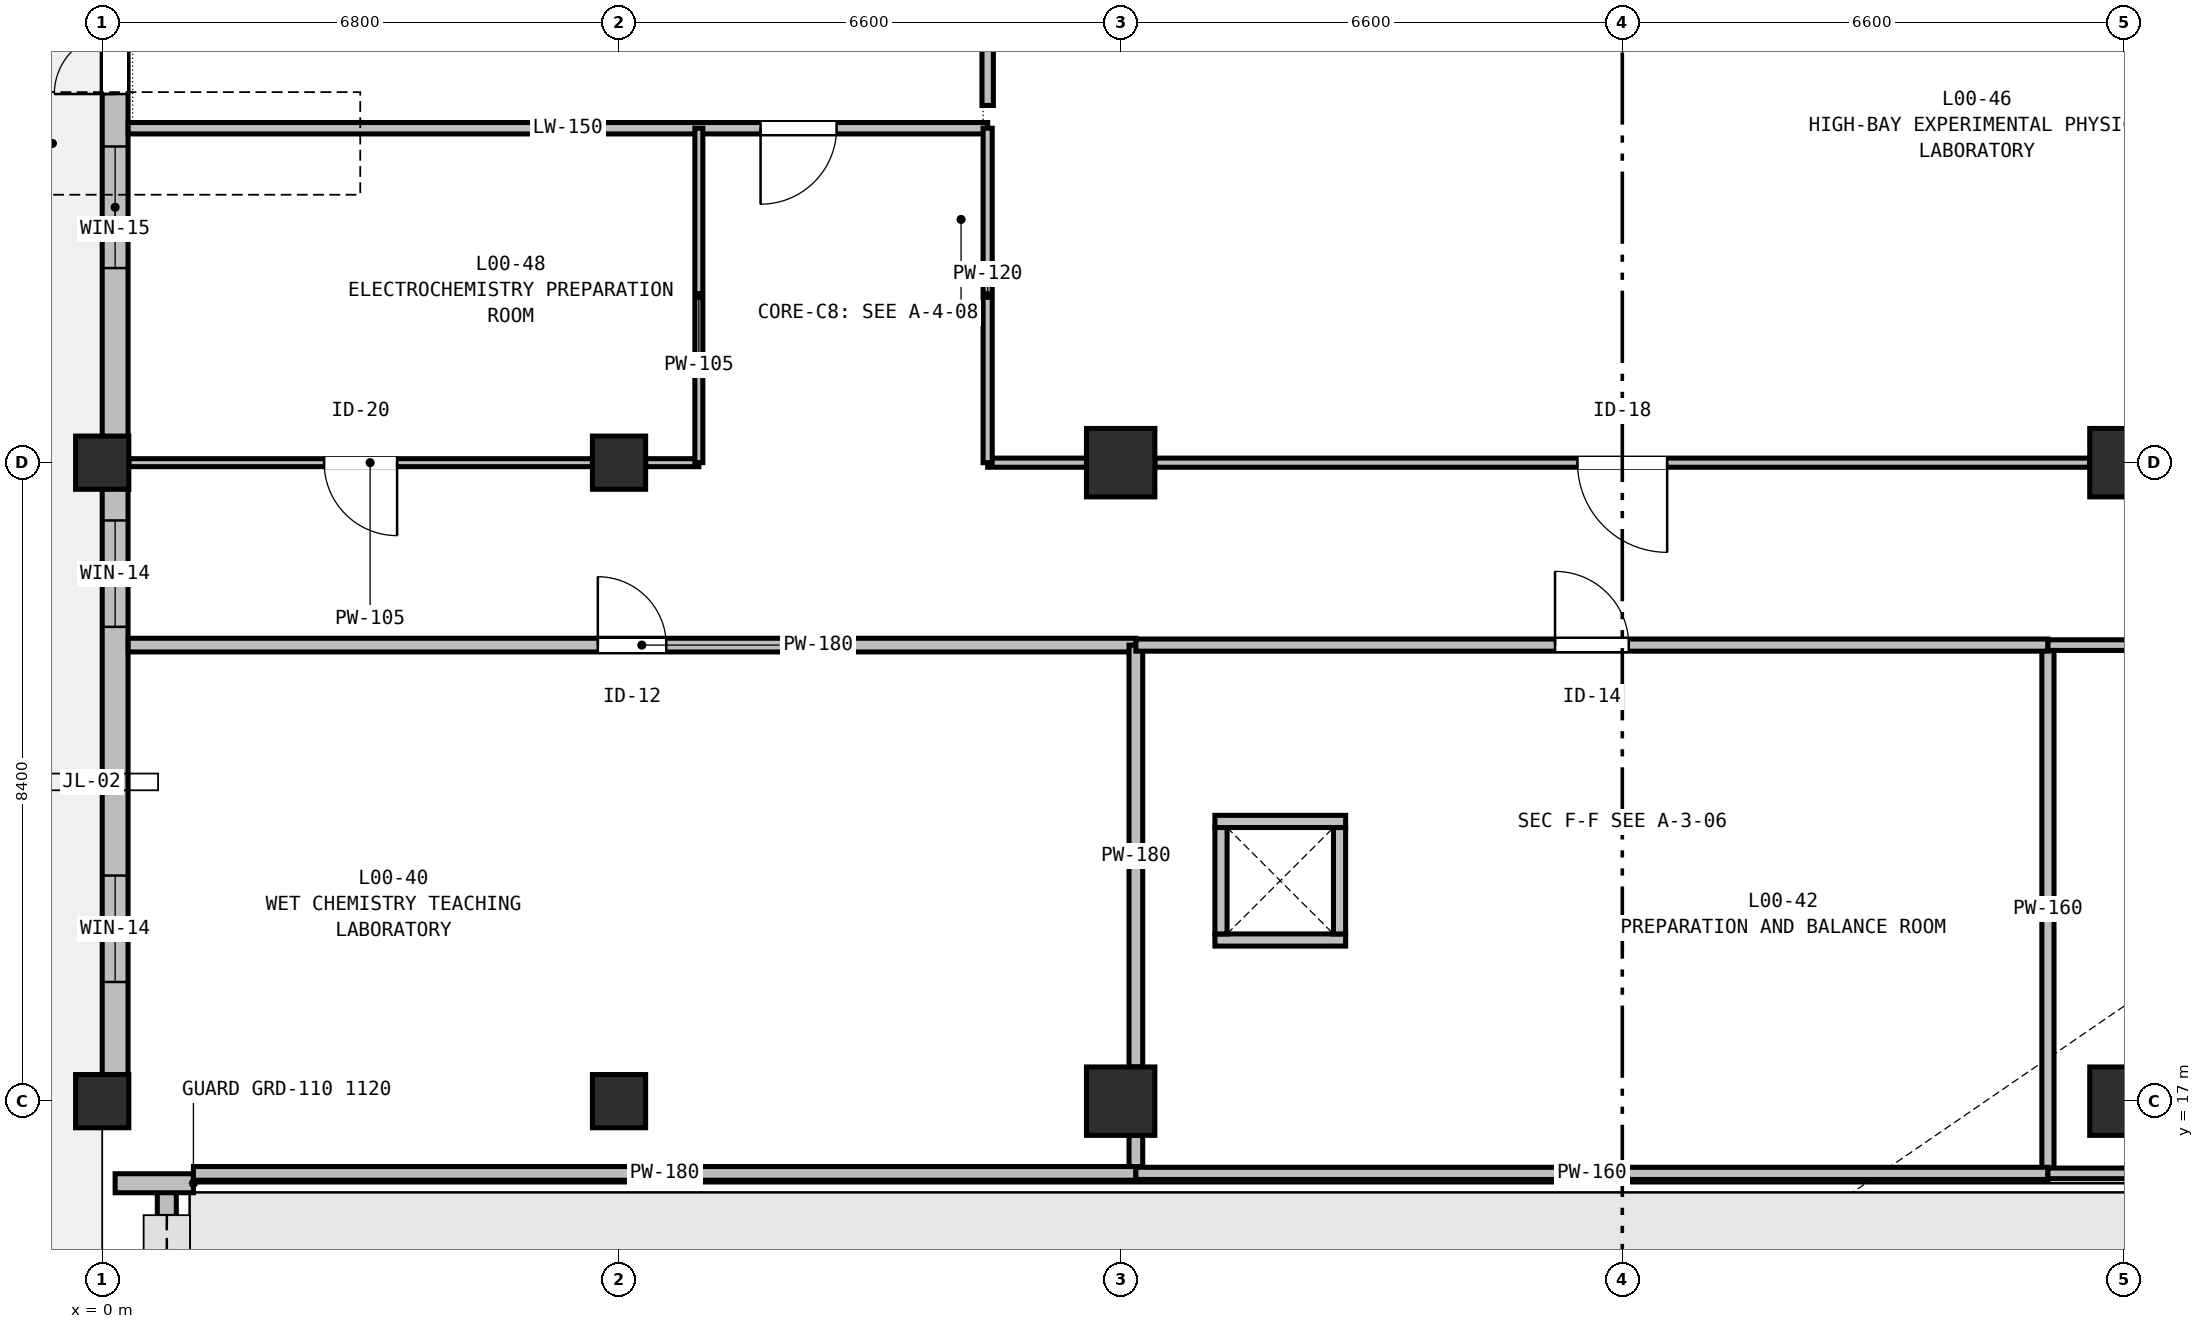
"""IFC4 building model, lengths in metres.
Left out: names, types, materials, properties, quantities, classifications, styles, units other than length and angle.
Written with IfcOpenShell. Run it as: python <this file> out.ifc"""

import sys

from ifc_helpers import new_model, si_unit, direction, frame, frame_2d, origin, origin_2d, place, context, subcontext, project, spatial, rectangle, extrude, element, fill, save


model = new_model("IFC4")
c1 = context("Model", 3, precision=1e-05, world=origin(), true_north=direction((0.0, 1.0)))
c2 = subcontext(c1, "Body", "Model", "MODEL_VIEW")
j1 = project(units=[si_unit("LENGTHUNIT", "METRE"), si_unit("PLANEANGLEUNIT", "RADIAN")], contexts=[c1])
p1 = place(None, origin())
s1 = spatial("IfcSite", under=j1, at=p1, CompositionType="ELEMENT")
p2 = place(p1, origin())
s2 = spatial("IfcBuilding", under=s1, at=p2, CompositionType="ELEMENT")
p3 = place(p2, origin())
s3 = spatial("IfcBuildingStorey", under=s2, at=p3, CompositionType="ELEMENT", Elevation=0.0)
for number, where, z_axis, x_axis in (
    (1, (0.0, 17.0, -0.32), (0.0, 0.0, 1.0), (1.0, 0.0, 0.0)),
    (2, (0.0, 25.4, -0.32), (0.0, 0.0, 1.0), (1.0, 0.0, 0.0)),
    (3, (6.8, 17.0, -0.32), (0.0, 0.0, 1.0), (1.0, 0.0, 0.0)),
    (4, (6.8, 25.4, -0.32), (0.0, 0.0, 1.0), (1.0, 0.0, 0.0)),
):
    element("IfcColumn", number, at=place(p3, frame(where, z_axis=z_axis, x_axis=x_axis)), inside=s3, PredefinedType="COLUMN", context=c2, shape_type="SweptSolid", body=[
        extrude(rectangle(XDim=0.7, YDim=0.7, at=origin_2d()), origin(), (0.0, 0.0, 1.0), 5.72),
    ])
for number, where, z_axis, x_axis in (
    (5, (13.4, 17.0, -0.32), (0.0, 0.0, 1.0), (1.0, 0.0, 0.0)),
    (6, (13.4, 25.4, -0.32), (0.0, 0.0, 1.0), (1.0, 0.0, 0.0)),
    (7, (26.6, 17.0, -0.32), (0.0, 0.0, 1.0), (1.0, 0.0, 0.0)),
    (8, (26.6, 25.4, -0.32), (0.0, 0.0, 1.0), (1.0, 0.0, 0.0)),
):
    element("IfcColumn", number, at=place(p3, frame(where, z_axis=z_axis, x_axis=x_axis)), inside=s3, PredefinedType="COLUMN", context=c2, shape_type="SweptSolid", body=[
        extrude(rectangle(XDim=0.9, YDim=0.9, at=origin_2d()), origin(), (0.0, 0.0, 1.0), 5.72),
    ])
p4 = place(p3, frame((0.17, 17.0, 0.0), z_axis=(0.0, 0.0, 1.0), x_axis=(0.0, 1.0, 0.0)))
e9 = element("IfcWall", 9, at=p4, inside=s3, PredefinedType="STANDARD", context=c2, shape_type="SweptSolid", body=[
    extrude(rectangle(XDim=8.4, YDim=0.34, at=frame_2d((4.2, 0.0))), origin(), (0.0, 0.0, 1.0), 4.685),
])
p5 = place(p4, frame((1.568, 0.0, 0.9)))
e10 = element("IfcOpeningElement", 10, at=p5, cuts=e9, PredefinedType="OPENING", context=c2, shape_type="SweptSolid", body=[
    extrude(rectangle(XDim=1.4, YDim=1.55, at=frame_2d((0.7, 0.775))), frame((0.0, 0.18, 0.0), z_axis=(0.0, -1.0, 0.0), x_axis=(1.0, 0.0, 0.0)), (0.0, 0.0, 1.0), 0.36),
])
p6 = place(p4, frame((6.24, 0.0, 0.9)))
e11 = element("IfcOpeningElement", 11, at=p6, cuts=e9, PredefinedType="OPENING", context=c2, shape_type="SweptSolid", body=[
    extrude(rectangle(XDim=1.4, YDim=1.55, at=frame_2d((0.7, 0.775))), frame((0.0, 0.18, 0.0), z_axis=(0.0, -1.0, 0.0), x_axis=(1.0, 0.0, 0.0)), (0.0, 0.0, 1.0), 0.36),
])
p7 = place(p3, frame((0.17, 25.4, 0.0), z_axis=(0.0, 0.0, 1.0), x_axis=(0.0, 1.0, 0.0)))
e12 = element("IfcWall", 12, at=p7, inside=s3, PredefinedType="STANDARD", context=c2, shape_type="SweptSolid", body=[
    extrude(rectangle(XDim=8.4, YDim=0.34, at=frame_2d((4.2, 0.0))), origin(), (0.0, 0.0, 1.0), 4.685),
])
p8 = place(p7, frame((4.85, 0.0, 0.0)))
e13 = element("IfcOpeningElement", 13, at=p8, cuts=e12, PredefinedType="OPENING", context=c2, shape_type="SweptSolid", body=[
    extrude(rectangle(XDim=1.6, YDim=2.2, at=frame_2d((0.8, 1.1))), frame((0.0, 0.18, 0.0), z_axis=(0.0, -1.0, 0.0), x_axis=(1.0, 0.0, 0.0)), (0.0, 0.0, 1.0), 0.36),
])
p9 = place(p7, frame((2.56, 0.0, 0.9)))
e14 = element("IfcOpeningElement", 14, at=p9, cuts=e12, PredefinedType="OPENING", context=c2, shape_type="SweptSolid", body=[
    extrude(rectangle(XDim=1.6, YDim=1.6, at=frame_2d((0.8, 0.8))), frame((0.0, 0.18, 0.0), z_axis=(0.0, -1.0, 0.0), x_axis=(1.0, 0.0, 0.0)), (0.0, 0.0, 1.0), 0.36),
])
p10 = place(p3, frame((0.85, 15.92, 0.0), z_axis=(0.0, 0.0, 1.0), x_axis=(0.0, -1.0, 0.0)))
e15 = element("IfcWall", 15, at=p10, inside=s3, PredefinedType="STANDARD", context=c2, shape_type="SweptSolid", body=[
    extrude(rectangle(XDim=6.24, YDim=0.25, at=frame_2d((3.12, 0.0))), origin(), (0.0, 0.0, 1.0), 4.45),
])
p11 = place(p10, frame((0.42, 0.0, 0.0)))
e16 = element("IfcOpeningElement", 16, at=p11, cuts=e15, PredefinedType="OPENING", context=c2, shape_type="SweptSolid", body=[
    extrude(rectangle(XDim=5.4, YDim=3.8, at=frame_2d((2.7, 1.9))), frame((0.0, 0.135, 0.0), z_axis=(0.0, -1.0, 0.0), x_axis=(1.0, 0.0, 0.0)), (0.0, 0.0, 1.0), 0.27),
])
p12 = place(p3, frame((0.17, 15.92, 0.0), z_axis=(0.0, 0.0, 1.0), x_axis=(1.0, 0.0, 0.0)))
e17 = element("IfcWall", 17, at=p12, inside=s3, PredefinedType="STANDARD", context=c2, shape_type="SweptSolid", body=[
    extrude(rectangle(XDim=1.03, YDim=0.25, at=frame_2d((0.515, 0.0))), origin(), (0.0, 0.0, 1.0), 4.45),
])
for number, where, z_axis, x_axis in (
    (18, (14.64, 19.12, 0.0), (0.0, 0.0, 1.0), (1.0, 0.0, 0.0)),
    (19, (14.64, 20.68, 0.0), (0.0, 0.0, 1.0), (1.0, 0.0, 0.0)),
):
    element("IfcWall", number, at=place(p3, frame(where, z_axis=z_axis, x_axis=x_axis)), inside=s3, PredefinedType="PARTITIONING", context=c2, shape_type="SweptSolid", body=[
        extrude(rectangle(XDim=1.72, YDim=0.16, at=frame_2d((0.86, 0.0))), origin(), (0.0, 0.0, 1.0), 5.095),
    ])
for number, where, z_axis, x_axis in (
    (20, (14.72, 19.2, 0.0), (0.0, 0.0, 1.0), (0.0, 1.0, 0.0)),
    (21, (16.28, 19.2, 0.0), (0.0, 0.0, 1.0), (0.0, 1.0, 0.0)),
):
    element("IfcWall", number, at=place(p3, frame(where, z_axis=z_axis, x_axis=x_axis)), inside=s3, PredefinedType="PARTITIONING", context=c2, shape_type="SweptSolid", body=[
        extrude(rectangle(XDim=1.4, YDim=0.16, at=frame_2d((0.7, 0.0))), origin(), (0.0, 0.0, 1.0), 5.095),
    ])
p13 = place(p3, frame((11.65, 33.7, 0.0), z_axis=(0.0, 0.0, 1.0), x_axis=(0.0, -1.0, 0.0)))
e22 = element("IfcWall", 22, at=p13, inside=s3, PredefinedType="PARTITIONING", context=c2, shape_type="SweptSolid", body=[
    extrude(rectangle(XDim=3.6, YDim=0.15, at=frame_2d((1.8, 0.0))), origin(), (0.0, 0.0, 1.0), 4.735),
])
p14 = place(p3, frame((11.65, 29.8, 0.0), z_axis=(0.0, 0.0, 1.0), x_axis=(-1.0, 0.0, 0.0)))
e23 = element("IfcWall", 23, at=p14, inside=s3, PredefinedType="PARTITIONING", context=c2, shape_type="SweptSolid", body=[
    extrude(rectangle(XDim=11.308, YDim=0.15, at=frame_2d((5.654, 0.0))), origin(), (0.0, 0.0, 1.0), 4.535),
])
p15 = place(p14, frame((1.988, 0.0, 0.0)))
e24 = element("IfcOpeningElement", 24, at=p15, cuts=e23, PredefinedType="OPENING", context=c2, shape_type="SweptSolid", body=[
    extrude(rectangle(XDim=1.0, YDim=2.1, at=frame_2d((0.5, 1.05))), frame((0.0, 0.085, 0.0), z_axis=(0.0, -1.0, 0.0), x_axis=(1.0, 0.0, 0.0)), (0.0, 0.0, 1.0), 0.17),
])
p16 = place(p3, frame((13.6, 16.05, 0.0), z_axis=(0.0, 0.0, 1.0), x_axis=(-1.0, 0.0, 0.0)))
e25 = element("IfcWall", 25, at=p16, inside=s3, PredefinedType="PARTITIONING", context=c2, shape_type="SweptSolid", body=[
    extrude(rectangle(XDim=12.4, YDim=0.18, at=frame_2d((6.2, 0.0))), origin(), (0.0, 0.0, 1.0), 4.535),
])
p17 = place(p3, frame((0.342, 23.0, 0.0), z_axis=(0.0, 0.0, 1.0), x_axis=(1.0, 0.0, 0.0)))
e26 = element("IfcWall", 26, at=p17, inside=s3, PredefinedType="PARTITIONING", context=c2, shape_type="SweptSolid", body=[
    extrude(rectangle(XDim=13.258, YDim=0.18, at=frame_2d((6.629, 0.0))), origin(), (0.0, 0.0, 1.0), 4.535),
])
p18 = place(p17, frame((6.179, 0.0, 0.0)))
e27 = element("IfcOpeningElement", 27, at=p18, cuts=e26, PredefinedType="OPENING", context=c2, shape_type="SweptSolid", body=[
    extrude(rectangle(XDim=0.9, YDim=2.1, at=frame_2d((0.45, 1.05))), frame((0.0, 0.1, 0.0), z_axis=(0.0, -1.0, 0.0), x_axis=(1.0, 0.0, 0.0)), (0.0, 0.0, 1.0), 0.2),
])
p19 = place(p3, frame((13.6, 23.0, 0.0), z_axis=(0.0, 0.0, 1.0), x_axis=(0.0, -1.0, 0.0)))
e28 = element("IfcWall", 28, at=p19, inside=s3, PredefinedType="PARTITIONING", context=c2, shape_type="SweptSolid", body=[
    extrude(rectangle(XDim=5.55, YDim=0.18, at=frame_2d((2.775, 0.0))), origin(), (0.0, 0.0, 1.0), 4.535),
])
p20 = place(p3, frame((13.6, 16.55, 0.0), z_axis=(0.0, 0.0, 1.0), x_axis=(0.0, -1.0, 0.0)))
e29 = element("IfcWall", 29, at=p20, inside=s3, PredefinedType="PARTITIONING", context=c2, shape_type="SweptSolid", body=[
    extrude(rectangle(XDim=0.41, YDim=0.18, at=frame_2d((0.205, 0.0))), origin(), (0.0, 0.0, 1.0), 4.535),
])
p21 = place(p3, frame((25.6, 23.0, 0.0), z_axis=(0.0, 0.0, 1.0), x_axis=(0.0, -1.0, 0.0)))
e30 = element("IfcWall", 30, at=p21, inside=s3, PredefinedType="PARTITIONING", context=c2, shape_type="SweptSolid", body=[
    extrude(rectangle(XDim=6.95, YDim=0.16, at=frame_2d((3.475, 0.0))), origin(), (0.0, 0.0, 1.0), 4.435),
])
p22 = place(p3, frame((25.6, 16.05, 0.0), z_axis=(0.0, 0.0, 1.0), x_axis=(-1.0, 0.0, 0.0)))
e31 = element("IfcWall", 31, at=p22, inside=s3, PredefinedType="PARTITIONING", context=c2, shape_type="SweptSolid", body=[
    extrude(rectangle(XDim=12.0, YDim=0.16, at=frame_2d((6.0, 0.0))), origin(), (0.0, 0.0, 1.0), 4.535),
])
p23 = place(p3, frame((13.6, 23.0, 0.0), z_axis=(0.0, 0.0, 1.0), x_axis=(1.0, 0.0, 0.0)))
e32 = element("IfcWall", 32, at=p23, inside=s3, PredefinedType="PARTITIONING", context=c2, shape_type="SweptSolid", body=[
    extrude(rectangle(XDim=12.0, YDim=0.16, at=frame_2d((6.0, 0.0))), origin(), (0.0, 0.0, 1.0), 4.535),
])
p24 = place(p23, frame((5.515, 0.0, 0.0)))
e33 = element("IfcOpeningElement", 33, at=p24, cuts=e32, PredefinedType="OPENING", context=c2, shape_type="SweptSolid", body=[
    extrude(rectangle(XDim=0.97, YDim=2.1, at=frame_2d((0.485, 1.05))), frame((0.0, 0.09, 0.0), z_axis=(0.0, -1.0, 0.0), x_axis=(1.0, 0.0, 0.0)), (0.0, 0.0, 1.0), 0.18),
])
p25 = place(p3, frame((33.2, 16.05, 0.0), z_axis=(0.0, 0.0, 1.0), x_axis=(-1.0, 0.0, 0.0)))
e34 = element("IfcWall", 34, at=p25, inside=s3, PredefinedType="PARTITIONING", context=c2, shape_type="SweptSolid", body=[
    extrude(rectangle(XDim=7.6, YDim=0.14, at=frame_2d((3.8, 0.0))), origin(), (0.0, 0.0, 1.0), 4.535),
])
p26 = place(p3, frame((25.6, 23.0, 0.0), z_axis=(0.0, 0.0, 1.0), x_axis=(1.0, 0.0, 0.0)))
e35 = element("IfcWall", 35, at=p26, inside=s3, PredefinedType="PARTITIONING", context=c2, shape_type="SweptSolid", body=[
    extrude(rectangle(XDim=15.0, YDim=0.14, at=frame_2d((7.5, 0.0))), origin(), (0.0, 0.0, 1.0), 4.535),
])
p27 = place(p26, frame((6.965, 0.0, 0.0)))
e36 = element("IfcOpeningElement", 36, at=p27, cuts=e35, PredefinedType="OPENING", context=c2, shape_type="SweptSolid", body=[
    extrude(rectangle(XDim=1.07, YDim=2.1, at=frame_2d((0.535, 1.05))), frame((0.0, 0.08, 0.0), z_axis=(0.0, -1.0, 0.0), x_axis=(1.0, 0.0, 0.0)), (0.0, 0.0, 1.0), 0.16),
])
p28 = place(p3, frame((26.15, 25.4, 0.0), z_axis=(0.0, 0.0, 1.0), x_axis=(-1.0, 0.0, 0.0)))
e37 = element("IfcWall", 37, at=p28, inside=s3, PredefinedType="PARTITIONING", context=c2, shape_type="SweptSolid", body=[
    extrude(rectangle(XDim=12.3, YDim=0.12, at=frame_2d((6.15, 0.0))), origin(), (0.0, 0.0, 1.0), 4.435),
])
p29 = place(p28, frame((5.56, 0.0, 0.0)))
e38 = element("IfcOpeningElement", 38, at=p29, cuts=e37, PredefinedType="OPENING", context=c2, shape_type="SweptSolid", body=[
    extrude(rectangle(XDim=1.18, YDim=2.1, at=frame_2d((0.59, 1.05))), frame((0.0, 0.07, 0.0), z_axis=(0.0, -1.0, 0.0), x_axis=(1.0, 0.0, 0.0)), (0.0, 0.0, 1.0), 0.14),
])
p30 = place(p3, frame((12.95, 25.4, 0.0), z_axis=(0.0, 0.0, 1.0), x_axis=(-1.0, 0.0, 0.0)))
e39 = element("IfcWall", 39, at=p30, inside=s3, PredefinedType="PARTITIONING", context=c2, shape_type="SweptSolid", body=[
    extrude(rectangle(XDim=1.3, YDim=0.12, at=frame_2d((0.65, 0.0))), origin(), (0.0, 0.0, 1.0), 4.735),
])
p31 = place(p3, frame((11.65, 25.4, 0.0), z_axis=(0.0, 0.0, 1.0), x_axis=(0.0, 1.0, 0.0)))
e40 = element("IfcWall", 40, at=p31, inside=s3, PredefinedType="PARTITIONING", context=c2, shape_type="SweptSolid", body=[
    extrude(rectangle(XDim=4.4, YDim=0.12, at=frame_2d((2.2, 0.0))), origin(), (0.0, 0.0, 1.0), 4.735),
])
p32 = place(p3, frame((7.85, 25.4, 0.0), z_axis=(0.0, 0.0, 1.0), x_axis=(-1.0, 0.0, 0.0)))
e41 = element("IfcWall", 41, at=p32, inside=s3, PredefinedType="PARTITIONING", context=c2, shape_type="SweptSolid", body=[
    extrude(rectangle(XDim=0.7, YDim=0.105, at=frame_2d((0.35, 0.0))), origin(), (0.0, 0.0, 1.0), 4.735),
])
p33 = place(p3, frame((6.45, 25.4, 0.0), z_axis=(0.0, 0.0, 1.0), x_axis=(-1.0, 0.0, 0.0)))
e42 = element("IfcWall", 42, at=p33, inside=s3, PredefinedType="PARTITIONING", context=c2, shape_type="SweptSolid", body=[
    extrude(rectangle(XDim=6.1, YDim=0.105, at=frame_2d((3.05, 0.0))), origin(), (0.0, 0.0, 1.0), 4.735),
])
p34 = place(p33, frame((2.57, 0.0, 0.0)))
e43 = element("IfcOpeningElement", 43, at=p34, cuts=e42, PredefinedType="OPENING", context=c2, shape_type="SweptSolid", body=[
    extrude(rectangle(XDim=0.96, YDim=2.14, at=frame_2d((0.48, 1.07))), frame((0.0, 0.062, 0.0), z_axis=(0.0, -1.0, 0.0), x_axis=(1.0, 0.0, 0.0)), (0.0, 0.0, 1.0), 0.125),
])
p35 = place(p3, frame((7.85, 29.8, 0.0), z_axis=(0.0, 0.0, 1.0), x_axis=(0.0, -1.0, 0.0)))
e44 = element("IfcWall", 44, at=p35, inside=s3, PredefinedType="PARTITIONING", context=c2, shape_type="SweptSolid", body=[
    extrude(rectangle(XDim=4.4, YDim=0.105, at=frame_2d((2.2, 0.0))), origin(), (0.0, 0.0, 1.0), 4.735),
])
p36 = place(p11, origin())
e45 = element("IfcDoor", 45, at=p36, inside=s3, OperationType="ROLLINGUP", PredefinedType="GATE", context=c2, shape_type="SweptSolid", body=[
    extrude(rectangle(XDim=5.4, YDim=3.8, at=frame_2d((2.7, 1.9))), frame((0.0, 0.025, 0.0), z_axis=(0.0, -1.0, 0.0), x_axis=(1.0, 0.0, 0.0)), (0.0, 0.0, 1.0), 0.05),
])
fill(e16, e45)
p37 = place(p8, origin())
e46 = element("IfcDoor", 46, at=p37, inside=s3, OperationType="DOUBLE_DOOR_SINGLE_SWING", PredefinedType="DOOR", context=c2, shape_type="SweptSolid", body=[
    extrude(rectangle(XDim=1.6, YDim=2.2, at=frame_2d((0.8, 1.1))), frame((0.0, 0.025, 0.0), z_axis=(0.0, -1.0, 0.0), x_axis=(1.0, 0.0, 0.0)), (0.0, 0.0, 1.0), 0.05),
])
fill(e13, e46)
p38 = place(p5, origin())
e47 = element("IfcWindow", 47, at=p38, inside=s3, PartitioningType="SINGLE_PANEL", PredefinedType="WINDOW", context=c2, shape_type="SweptSolid", body=[
    extrude(rectangle(XDim=1.4, YDim=1.55, at=frame_2d((0.7, 0.775))), frame((0.0, 0.03, 0.0), z_axis=(0.0, -1.0, 0.0), x_axis=(1.0, 0.0, 0.0)), (0.0, 0.0, 1.0), 0.06),
])
fill(e10, e47)
p39 = place(p6, origin())
e48 = element("IfcWindow", 48, at=p39, inside=s3, PartitioningType="SINGLE_PANEL", PredefinedType="WINDOW", context=c2, shape_type="SweptSolid", body=[
    extrude(rectangle(XDim=1.4, YDim=1.55, at=frame_2d((0.7, 0.775))), frame((0.0, 0.03, 0.0), z_axis=(0.0, -1.0, 0.0), x_axis=(1.0, 0.0, 0.0)), (0.0, 0.0, 1.0), 0.06),
])
fill(e11, e48)
p40 = place(p9, origin())
e49 = element("IfcWindow", 49, at=p40, inside=s3, PartitioningType="SINGLE_PANEL", PredefinedType="WINDOW", context=c2, shape_type="SweptSolid", body=[
    extrude(rectangle(XDim=1.6, YDim=1.6, at=frame_2d((0.8, 0.8))), frame((0.0, 0.03, 0.0), z_axis=(0.0, -1.0, 0.0), x_axis=(1.0, 0.0, 0.0)), (0.0, 0.0, 1.0), 0.06),
])
fill(e14, e49)
p41 = place(p15, origin())
e50 = element("IfcDoor", 50, at=p41, inside=s3, OperationType="SINGLE_SWING_RIGHT", PredefinedType="DOOR", context=c2, shape_type="SweptSolid", body=[
    extrude(rectangle(XDim=1.0, YDim=2.1, at=frame_2d((0.5, 1.05))), frame((0.0, 0.025, 0.0), z_axis=(0.0, -1.0, 0.0), x_axis=(1.0, 0.0, 0.0)), (0.0, 0.0, 1.0), 0.05),
])
fill(e24, e50)
p42 = place(p18, origin())
e51 = element("IfcDoor", 51, at=p42, inside=s3, OperationType="SINGLE_SWING_LEFT", PredefinedType="DOOR", context=c2, shape_type="SweptSolid", body=[
    extrude(rectangle(XDim=0.9, YDim=2.1, at=frame_2d((0.45, 1.05))), frame((0.0, 0.025, 0.0), z_axis=(0.0, -1.0, 0.0), x_axis=(1.0, 0.0, 0.0)), (0.0, 0.0, 1.0), 0.05),
])
fill(e27, e51)
p43 = place(p24, origin())
e52 = element("IfcDoor", 52, at=p43, inside=s3, OperationType="SINGLE_SWING_LEFT", PredefinedType="DOOR", context=c2, shape_type="SweptSolid", body=[
    extrude(rectangle(XDim=0.97, YDim=2.1, at=frame_2d((0.485, 1.05))), frame((0.0, 0.025, 0.0), z_axis=(0.0, -1.0, 0.0), x_axis=(1.0, 0.0, 0.0)), (0.0, 0.0, 1.0), 0.05),
])
fill(e33, e52)
p44 = place(p29, origin())
e53 = element("IfcDoor", 53, at=p44, inside=s3, OperationType="SINGLE_SWING_LEFT", PredefinedType="DOOR", context=c2, shape_type="SweptSolid", body=[
    extrude(rectangle(XDim=1.18, YDim=2.1, at=frame_2d((0.59, 1.05))), frame((0.0, 0.025, 0.0), z_axis=(0.0, -1.0, 0.0), x_axis=(1.0, 0.0, 0.0)), (0.0, 0.0, 1.0), 0.05),
])
fill(e38, e53)
p45 = place(p34, origin())
e54 = element("IfcDoor", 54, at=p45, inside=s3, OperationType="SINGLE_SWING_LEFT", PredefinedType="DOOR", context=c2, shape_type="SweptSolid", body=[
    extrude(rectangle(XDim=0.96, YDim=2.14, at=frame_2d((0.48, 1.07))), frame((0.0, 0.025, 0.0), z_axis=(0.0, -1.0, 0.0), x_axis=(1.0, 0.0, 0.0)), (0.0, 0.0, 1.0), 0.05),
])
fill(e43, e54)
save(model, sys.argv[1])
